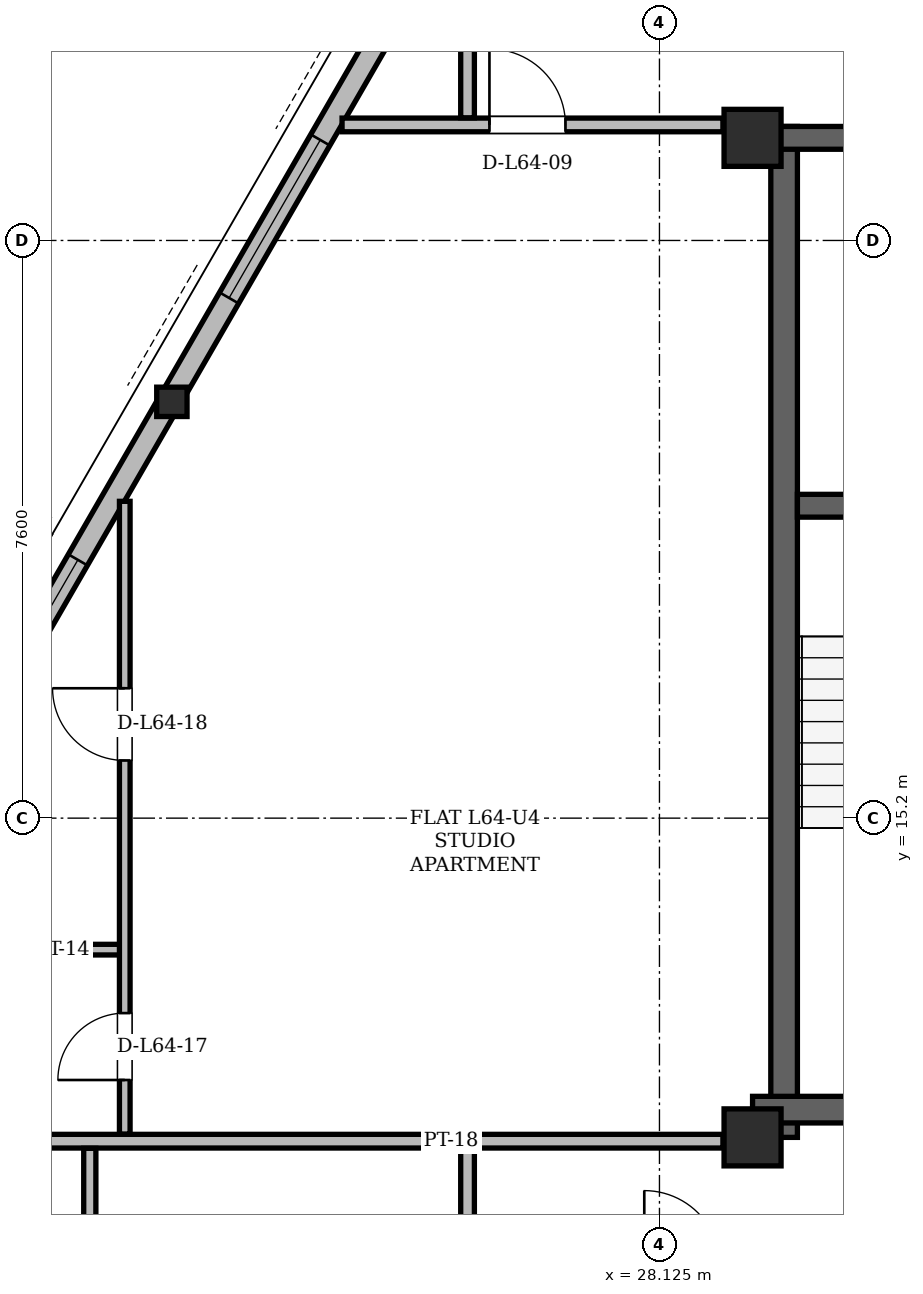
"""IFC4 building model, lengths in metres.
Left out: names, types, materials, properties, quantities, classifications, styles, units other than length and angle.
Written with IfcOpenShell. Run it as: python <this file> out.ifc"""

import sys

from ifc_helpers import new_model, si_unit, direction, frame, frame_2d, origin, origin_2d, place, context, subcontext, project, spatial, rectangle, hollow_rectangle, i_section, extrude, element, fill, save


model = new_model("IFC4")
c1 = context("Model", 3, precision=1e-05, world=origin(), true_north=direction((0.0, 1.0)))
c2 = subcontext(c1, "Body", "Model", "MODEL_VIEW")
j1 = project(units=[si_unit("LENGTHUNIT", "METRE"), si_unit("PLANEANGLEUNIT", "RADIAN")], contexts=[c1])
p1 = place(None, origin())
s1 = spatial("IfcSite", under=j1, at=p1, CompositionType="ELEMENT")
p2 = place(p1, origin())
s2 = spatial("IfcBuilding", under=s1, at=p2, CompositionType="ELEMENT")
p3 = place(p2, frame((0.0, 0.0, 241.5)))
s3 = spatial("IfcBuildingStorey", under=s2, at=p3, CompositionType="ELEMENT", Elevation=241.5)
for number, where, z_axis, x_axis in (
    (1, (29.35, 11.0, 0.0), (0.0, 0.0, 1.0), (1.0, 0.0, 0.0)),
    (2, (29.35, 24.15, 0.0), (0.0, 0.0, 1.0), (1.0, 0.0, 0.0)),
):
    element("IfcColumn", number, at=place(p3, frame(where, z_axis=z_axis, x_axis=x_axis)), inside=s3, PredefinedType="COLUMN", context=c2, shape_type="SweptSolid", body=[
        extrude(hollow_rectangle(XDim=0.75, YDim=0.75, WallThickness=0.06, at=origin_2d()), origin(), (0.0, 0.0, 1.0), 3.6),
    ])
p4 = place(p3, frame((21.685, 20.697, 0.004), z_axis=(0.013730940464, -0.011147892258, 0.999843580653), x_axis=(0.63030320246, 0.776349066444, 0.0)))
e3 = element("IfcColumn", 3, at=p4, inside=s3, PredefinedType="COLUMN", context=c2, shape_type="SweptSolid", body=[
    extrude(i_section(OverallWidth=0.399, OverallDepth=0.386, WebThickness=0.021, FlangeThickness=0.033, at=origin_2d()), origin(), (0.0, 0.0, 1.0), 3.592),
])
p5 = place(p3, frame((29.765, 11.0, 0.0), z_axis=(0.0, 0.0, 1.0), x_axis=(0.0, 1.0, 0.0)))
e4 = element("IfcWall", 4, at=p5, inside=s3, PredefinedType="SHEAR", context=c2, shape_type="SweptSolid", body=[
    extrude(rectangle(XDim=13.3, YDim=0.35, at=frame_2d((6.65, 0.0))), origin(), (0.0, 0.0, 1.0), 3.34),
])
p6 = place(p3, frame((29.35, 11.365, 0.0), z_axis=(0.0, 0.0, 1.0), x_axis=(1.0, 0.0, 0.0)))
e5 = element("IfcWall", 5, at=p6, inside=s3, PredefinedType="SHEAR", context=c2, shape_type="SweptSolid", body=[
    extrude(rectangle(XDim=7.1, YDim=0.35, at=frame_2d((3.55, 0.0))), origin(), (0.0, 0.0, 1.0), 3.34),
])
p7 = place(p3, frame((29.65, 24.15, 0.0), z_axis=(0.0, 0.0, 1.0), x_axis=(1.0, 0.0, 0.0)))
e6 = element("IfcWall", 6, at=p7, inside=s3, PredefinedType="SHEAR", context=c2, shape_type="SweptSolid", body=[
    extrude(rectangle(XDim=15.7, YDim=0.3, at=frame_2d((7.85, 0.0))), origin(), (0.0, 0.0, 1.0), 3.34),
])
p8 = place(p7, frame((1.7, 0.0, 0.0)))
e7 = element("IfcOpeningElement", 7, at=p8, cuts=e6, PredefinedType="OPENING", context=c2, shape_type="SweptSolid", body=[
    extrude(rectangle(XDim=1.2, YDim=2.2, at=frame_2d((0.6, 1.1))), frame((0.0, 0.15, 0.0), z_axis=(0.0, -1.0, 0.0), x_axis=(1.0, 0.0, 0.0)), (0.0, 0.0, 1.0), 0.3),
])
p9 = place(p7, frame((12.8, 0.0, 0.0)))
e8 = element("IfcOpeningElement", 8, at=p9, cuts=e6, PredefinedType="OPENING", context=c2, shape_type="SweptSolid", body=[
    extrude(rectangle(XDim=1.2, YDim=2.2, at=frame_2d((0.6, 1.1))), frame((0.0, 0.15, 0.0), z_axis=(0.0, -1.0, 0.0), x_axis=(1.0, 0.0, 0.0)), (0.0, 0.0, 1.0), 0.3),
])
p10 = place(p7, frame((7.4, 0.0, 0.0)))
e9 = element("IfcOpeningElement", 9, at=p10, cuts=e6, PredefinedType="OPENING", context=c2, shape_type="SweptSolid", body=[
    extrude(rectangle(XDim=0.9, YDim=2.05, at=frame_2d((0.45, 1.025))), frame((0.0, 0.15, 0.0), z_axis=(0.0, -1.0, 0.0), x_axis=(1.0, 0.0, 0.0)), (0.0, 0.0, 1.0), 0.3),
])
p11 = place(p3, frame((29.94, 19.31, 0.0), z_axis=(0.0, 0.0, 1.0), x_axis=(1.0, 0.0, 0.0)))
e10 = element("IfcWall", 10, at=p11, inside=s3, PredefinedType="SHEAR", context=c2, shape_type="SweptSolid", body=[
    extrude(rectangle(XDim=4.01, YDim=0.3, at=frame_2d((2.005, 0.0))), origin(), (0.0, 0.0, 1.0), 3.34),
])
p12 = place(p11, frame((1.01, 0.0, 0.0)))
e11 = element("IfcOpeningElement", 11, at=p12, cuts=e10, PredefinedType="OPENING", context=c2, shape_type="SweptSolid", body=[
    extrude(rectangle(XDim=1.4, YDim=2.2, at=frame_2d((0.7, 1.1))), frame((0.0, 0.15, 0.0), z_axis=(0.0, -1.0, 0.0), x_axis=(1.0, 0.0, 0.0)), (0.0, 0.0, 1.0), 0.3),
])
p13 = place(p3, frame((34.618, 43.098, 0.0), z_axis=(0.0, 0.0, 1.0), x_axis=(-0.499999075663, -0.86602593745, 0.0)))
e12 = element("IfcWall", 12, at=p13, inside=s3, PredefinedType="SOLIDWALL", context=c2, shape_type="SweptSolid", body=[
    extrude(rectangle(XDim=36.951, YDim=0.29, at=frame_2d((18.476, 0.0))), origin(), (0.0, 0.0, 1.0), 2.637),
])
p14 = place(p13, frame((8.244, 0.0, 0.0)))
e13 = element("IfcOpeningElement", 13, at=p14, cuts=e12, PredefinedType="OPENING", context=c2, shape_type="SweptSolid", body=[
    extrude(rectangle(XDim=1.5, YDim=2.2, at=frame_2d((0.75, 1.1))), frame((0.0, 0.145, 0.0), z_axis=(0.0, -1.0, 0.0), x_axis=(1.0, 0.0, 0.0)), (0.0, 0.0, 1.0), 0.29),
])
p15 = place(p13, frame((32.022, 0.0, 0.0)))
e14 = element("IfcOpeningElement", 14, at=p15, cuts=e12, PredefinedType="OPENING", context=c2, shape_type="SweptSolid", body=[
    extrude(rectangle(XDim=1.5, YDim=2.2, at=frame_2d((0.75, 1.1))), frame((0.0, 0.145, 0.0), z_axis=(0.0, -1.0, 0.0), x_axis=(1.0, 0.0, 0.0)), (0.0, 0.0, 1.0), 0.29),
])
p16 = place(p13, frame((21.911, 0.0, 0.85)))
e15 = element("IfcOpeningElement", 15, at=p16, cuts=e12, PredefinedType="OPENING", context=c2, shape_type="SweptSolid", body=[
    extrude(rectangle(XDim=2.4, YDim=1.677, at=frame_2d((1.2, 0.838))), frame((0.0, 0.145, 0.0), z_axis=(0.0, -1.0, 0.0), x_axis=(1.0, 0.0, 0.0)), (0.0, 0.0, 1.0), 0.29),
])
p17 = place(p13, frame((28.29, 0.0, 0.85)))
e16 = element("IfcOpeningElement", 16, at=p17, cuts=e12, PredefinedType="OPENING", context=c2, shape_type="SweptSolid", body=[
    extrude(rectangle(XDim=1.2, YDim=1.48, at=frame_2d((0.6, 0.74))), frame((0.0, 0.145, 0.0), z_axis=(0.0, -1.0, 0.0), x_axis=(1.0, 0.0, 0.0)), (0.0, 0.0, 1.0), 0.29),
])
p18 = place(p13, frame((34.755, 0.0, 0.85)))
e17 = element("IfcOpeningElement", 17, at=p18, cuts=e12, PredefinedType="OPENING", context=c2, shape_type="SweptSolid", body=[
    extrude(rectangle(XDim=1.2, YDim=1.48, at=frame_2d((0.6, 0.74))), frame((0.0, 0.145, 0.0), z_axis=(0.0, -1.0, 0.0), x_axis=(1.0, 0.0, 0.0)), (0.0, 0.0, 1.0), 0.29),
])
p19 = place(p13, frame((12.233, 0.0, 0.85)))
e18 = element("IfcOpeningElement", 18, at=p19, cuts=e12, PredefinedType="OPENING", context=c2, shape_type="SweptSolid", body=[
    extrude(rectangle(XDim=1.2, YDim=1.48, at=frame_2d((0.6, 0.74))), frame((0.0, 0.145, 0.0), z_axis=(0.0, -1.0, 0.0), x_axis=(1.0, 0.0, 0.0)), (0.0, 0.0, 1.0), 0.29),
])
p20 = place(p13, frame((16.59, 0.0, 0.85)))
e19 = element("IfcOpeningElement", 19, at=p20, cuts=e12, PredefinedType="OPENING", context=c2, shape_type="SweptSolid", body=[
    extrude(rectangle(XDim=2.0, YDim=1.677, at=frame_2d((1.0, 0.838))), frame((0.0, 0.145, 0.0), z_axis=(0.0, -1.0, 0.0), x_axis=(1.0, 0.0, 0.0)), (0.0, 0.0, 1.0), 0.29),
])
p21 = place(p13, frame((3.092, 0.0, 0.85)))
e20 = element("IfcOpeningElement", 20, at=p21, cuts=e12, PredefinedType="OPENING", context=c2, shape_type="SweptSolid", body=[
    extrude(rectangle(XDim=1.2, YDim=1.48, at=frame_2d((0.6, 0.74))), frame((0.0, 0.145, 0.0), z_axis=(0.0, -1.0, 0.0), x_axis=(1.0, 0.0, 0.0)), (0.0, 0.0, 1.0), 0.29),
])
p22 = place(p3, frame((16.528, 10.95, 0.0), z_axis=(0.0, 0.0, 1.0), x_axis=(1.0, 0.0, 0.0)))
e21 = element("IfcWall", 21, at=p22, inside=s3, PredefinedType="PARTITIONING", context=c2, shape_type="SweptSolid", body=[
    extrude(rectangle(XDim=12.432, YDim=0.18, at=frame_2d((6.216, 0.0))), origin(), (0.0, 0.0, 1.0), 2.873),
])
p23 = place(p3, frame((17.685, 13.47, 0.0), z_axis=(0.0, 0.0, 1.0), x_axis=(1.0, 0.0, 0.0)))
e22 = element("IfcWall", 22, at=p23, inside=s3, PredefinedType="PARTITIONING", context=c2, shape_type="SweptSolid", body=[
    extrude(rectangle(XDim=3.406, YDim=0.14, at=frame_2d((1.703, 0.0))), origin(), (0.0, 0.0, 1.0), 3.34),
])
p24 = place(p3, frame((23.949, 24.32, 0.0), z_axis=(0.0, 0.0, 1.0), x_axis=(1.0, 0.0, 0.0)))
e23 = element("IfcWall", 23, at=p24, inside=s3, PredefinedType="PARTITIONING", context=c2, shape_type="SweptSolid", body=[
    extrude(rectangle(XDim=5.011, YDim=0.18, at=frame_2d((2.505, 0.0))), origin(), (0.0, 0.0, 1.0), 3.34),
])
p25 = place(p24, frame((1.939, 0.0, 0.0)))
e24 = element("IfcOpeningElement", 24, at=p25, cuts=e23, PredefinedType="OPENING", context=c2, shape_type="SweptSolid", body=[
    extrude(rectangle(XDim=1.0, YDim=2.18, at=frame_2d((0.5, 1.09))), frame((0.0, 0.09, 0.0), z_axis=(0.0, -1.0, 0.0), x_axis=(1.0, 0.0, 0.0)), (0.0, 0.0, 1.0), 0.18),
])
p26 = place(p3, frame((20.63, 6.254, 0.0), z_axis=(0.0, 0.0, 1.0), x_axis=(0.0, 1.0, 0.0)))
e25 = element("IfcWall", 25, at=p26, inside=s3, PredefinedType="PARTITIONING", context=c2, shape_type="SweptSolid", body=[
    extrude(rectangle(XDim=4.602, YDim=0.16, at=frame_2d((2.301, 0.0))), origin(), (0.0, 0.0, 1.0), 2.873),
])
p27 = place(p26, frame((1.908, 0.0, 0.0)))
e26 = element("IfcOpeningElement", 26, at=p27, cuts=e25, PredefinedType="OPENING", context=c2, shape_type="SweptSolid", body=[
    extrude(rectangle(XDim=0.88, YDim=2.08, at=frame_2d((0.44, 1.04))), frame((0.0, 0.08, 0.0), z_axis=(0.0, -1.0, 0.0), x_axis=(1.0, 0.0, 0.0)), (0.0, 0.0, 1.0), 0.16),
])
p28 = place(p3, frame((21.09, 11.044, 0.0), z_axis=(0.0, 0.0, 1.0), x_axis=(0.0, 1.0, 0.0)))
e27 = element("IfcWall", 27, at=p28, inside=s3, PredefinedType="PARTITIONING", context=c2, shape_type="SweptSolid", body=[
    extrude(rectangle(XDim=8.324, YDim=0.14, at=frame_2d((4.162, 0.0))), origin(), (0.0, 0.0, 1.0), 3.34),
])
p29 = place(p28, frame((0.711, 0.0, 0.0)))
e28 = element("IfcOpeningElement", 28, at=p29, cuts=e27, PredefinedType="OPENING", context=c2, shape_type="SweptSolid", body=[
    extrude(rectangle(XDim=0.88, YDim=2.08, at=frame_2d((0.44, 1.04))), frame((0.0, 0.07, 0.0), z_axis=(0.0, -1.0, 0.0), x_axis=(1.0, 0.0, 0.0)), (0.0, 0.0, 1.0), 0.14),
])
p30 = place(p28, frame((4.915, 0.0, 0.0)))
e29 = element("IfcOpeningElement", 29, at=p30, cuts=e27, PredefinedType="OPENING", context=c2, shape_type="SweptSolid", body=[
    extrude(rectangle(XDim=0.95, YDim=2.1, at=frame_2d((0.475, 1.05))), frame((0.0, 0.07, 0.0), z_axis=(0.0, -1.0, 0.0), x_axis=(1.0, 0.0, 0.0)), (0.0, 0.0, 1.0), 0.14),
])
for number, where, z_axis, x_axis in (
    (30, (25.6, 9.394, 0.0), (0.0, 0.0, 1.0), (0.0, 1.0, 0.0)),
    (31, (25.6, 24.414, 0.0), (0.0, 0.0, 1.0), (0.0, 1.0, 0.0)),
):
    element("IfcWall", number, at=place(p3, frame(where, z_axis=z_axis, x_axis=x_axis)), inside=s3, PredefinedType="PARTITIONING", context=c2, shape_type="SweptSolid", body=[
        extrude(rectangle(XDim=1.462, YDim=0.18, at=frame_2d((0.731, 0.0))), origin(), (0.0, 0.0, 1.0), 3.34),
    ])
p31 = place(p16, origin())
e32 = element("IfcWindow", 32, at=p31, inside=s3, PartitioningType="SINGLE_PANEL", PredefinedType="WINDOW", context=c2, shape_type="SweptSolid", body=[
    extrude(rectangle(XDim=2.4, YDim=1.677, at=frame_2d((1.2, 0.838))), frame((0.0, 0.03, 0.0), z_axis=(0.0, -1.0, 0.0), x_axis=(1.0, 0.0, 0.0)), (0.0, 0.0, 1.0), 0.06),
])
fill(e15, e32)
p32 = place(p17, origin())
e33 = element("IfcWindow", 33, at=p32, inside=s3, PartitioningType="SINGLE_PANEL", PredefinedType="WINDOW", context=c2, shape_type="SweptSolid", body=[
    extrude(rectangle(XDim=1.2, YDim=1.48, at=frame_2d((0.6, 0.74))), frame((0.0, 0.03, 0.0), z_axis=(0.0, -1.0, 0.0), x_axis=(1.0, 0.0, 0.0)), (0.0, 0.0, 1.0), 0.06),
])
fill(e16, e33)
p33 = place(p25, origin())
e34 = element("IfcDoor", 34, at=p33, inside=s3, OperationType="SINGLE_SWING_LEFT", PredefinedType="DOOR", context=c2, shape_type="SweptSolid", body=[
    extrude(rectangle(XDim=1.0, YDim=2.18, at=frame_2d((0.5, 1.09))), frame((0.0, 0.025, 0.0), z_axis=(0.0, -1.0, 0.0), x_axis=(1.0, 0.0, 0.0)), (0.0, 0.0, 1.0), 0.05),
])
fill(e24, e34)
p34 = place(p29, origin())
e35 = element("IfcDoor", 35, at=p34, inside=s3, OperationType="SINGLE_SWING_LEFT", PredefinedType="DOOR", context=c2, shape_type="SweptSolid", body=[
    extrude(rectangle(XDim=0.88, YDim=2.08, at=frame_2d((0.44, 1.04))), frame((0.0, 0.025, 0.0), z_axis=(0.0, -1.0, 0.0), x_axis=(1.0, 0.0, 0.0)), (0.0, 0.0, 1.0), 0.05),
])
fill(e28, e35)
p35 = place(p30, origin())
e36 = element("IfcDoor", 36, at=p35, inside=s3, OperationType="SINGLE_SWING_RIGHT", PredefinedType="DOOR", context=c2, shape_type="SweptSolid", body=[
    extrude(rectangle(XDim=0.95, YDim=2.1, at=frame_2d((0.475, 1.05))), frame((0.0, 0.025, 0.0), z_axis=(0.0, -1.0, 0.0), x_axis=(1.0, 0.0, 0.0)), (0.0, 0.0, 1.0), 0.05),
])
fill(e29, e36)
save(model, sys.argv[1])
